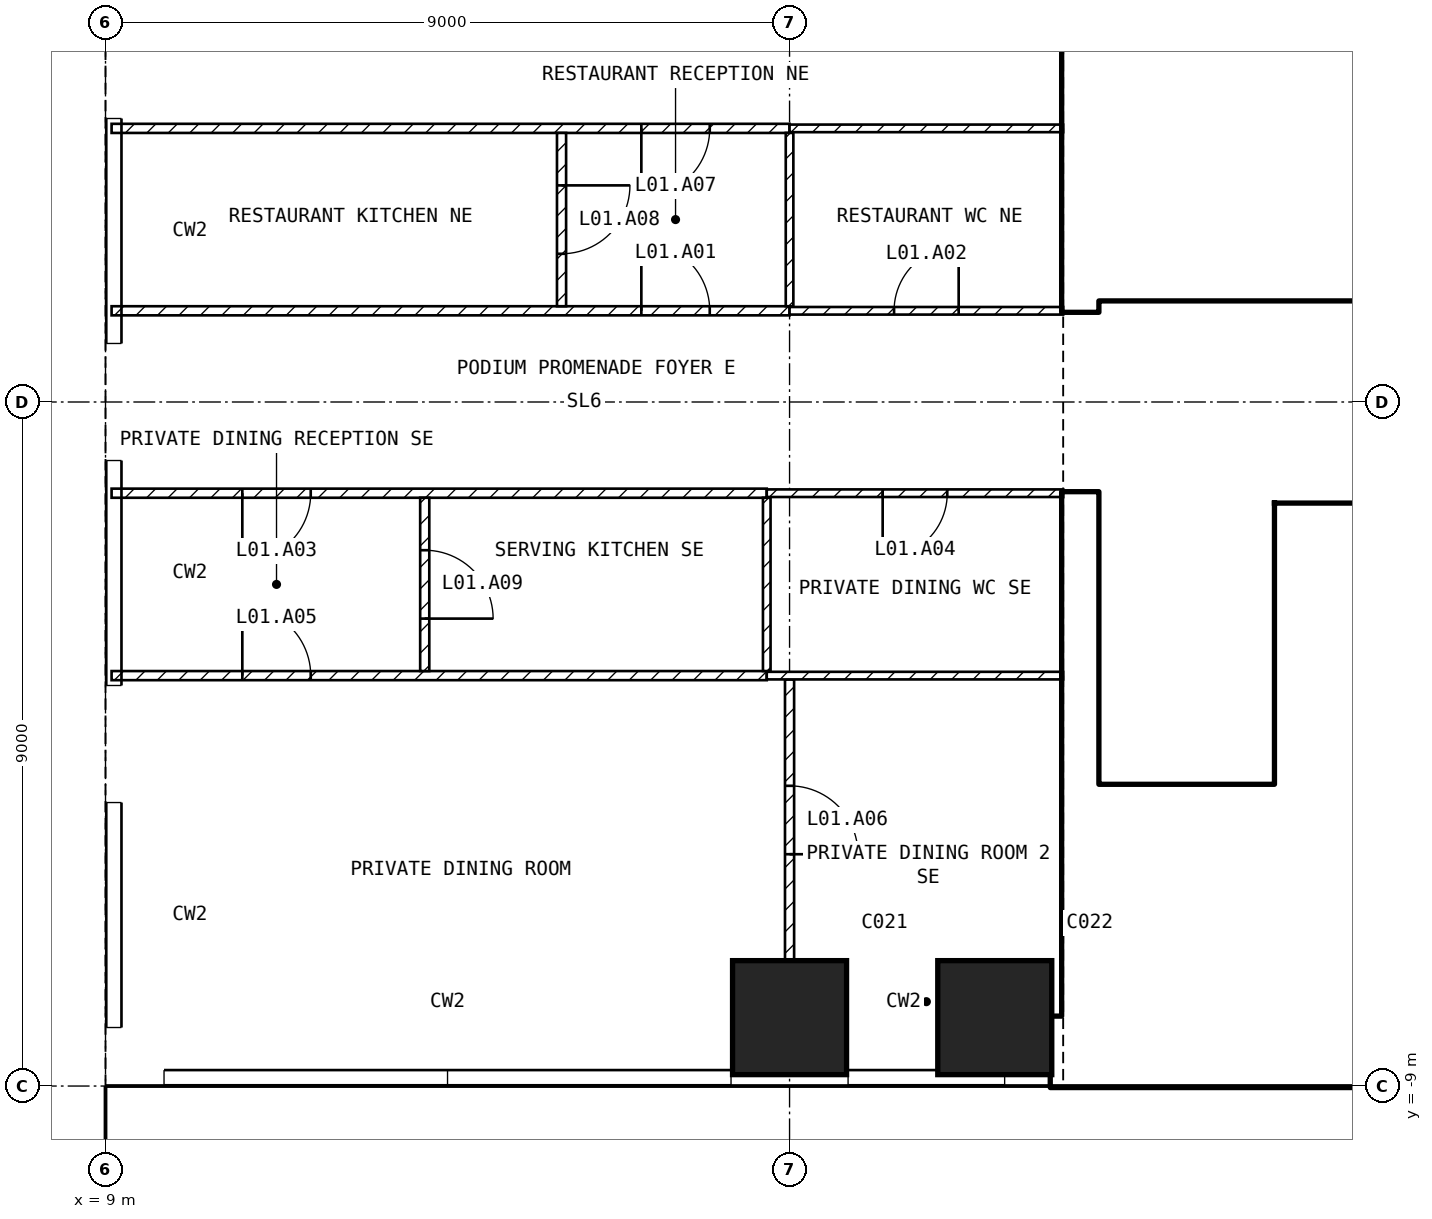
"""IFC4 building model, lengths in metres.
Left out: names, types, materials, properties, quantities, classifications, styles, units other than length and angle.
Written with IfcOpenShell. Run it as: python <this file> out.ifc"""

import sys

from ifc_helpers import new_model, si_unit, direction, frame, frame_2d, origin, origin_2d, place, context, subcontext, project, spatial, rectangle, extrude, element, fill, save


model = new_model("IFC4")
c1 = context("Model", 3, precision=1e-05, world=origin(), true_north=direction((0.0, 1.0)))
c2 = subcontext(c1, "Body", "Model", "MODEL_VIEW")
j1 = project(units=[si_unit("LENGTHUNIT", "METRE"), si_unit("PLANEANGLEUNIT", "RADIAN")], contexts=[c1])
p1 = place(None, origin())
s1 = spatial("IfcSite", under=j1, at=p1, CompositionType="ELEMENT")
p2 = place(p1, origin())
s2 = spatial("IfcBuilding", under=s1, at=p2, CompositionType="ELEMENT")
p3 = place(p2, origin())
s3 = spatial("IfcBuildingStorey", under=s2, at=p3, CompositionType="ELEMENT", Elevation=0.0)
p4 = place(p3, frame((7.65, -25.2, -0.4), z_axis=(0.0, 0.0, 1.0), x_axis=(0.0, 1.0, 0.0)))
e1 = element("IfcWall", 1, at=p4, inside=s3, PredefinedType="SOLIDWALL", context=c2, shape_type="SweptSolid", body=[
    extrude(rectangle(XDim=50.4, YDim=2.7, at=frame_2d((25.2, 0.0))), origin(), (0.0, 0.0, 1.0), 20.0),
])
p5 = place(p2, frame((0.0, 0.0, 15.0)))
s4 = spatial("IfcBuildingStorey", under=s2, at=p5, CompositionType="ELEMENT", Elevation=15.0)
for number, where, z_axis, x_axis in (
    (2, (18.0, -8.1, -0.3), (0.0, 0.0, 1.0), (1.0, 0.0, 0.0)),
    (3, (20.7, -8.1, -0.3), (0.0, 0.0, 1.0), (1.0, 0.0, 0.0)),
):
    element("IfcColumn", number, at=place(p5, frame(where, z_axis=z_axis, x_axis=x_axis)), inside=s4, PredefinedType="COLUMN", context=c2, shape_type="SweptSolid", body=[
        extrude(rectangle(XDim=1.5, YDim=1.5, at=origin_2d()), origin(), (0.0, 0.0, 1.0), 6.0),
    ])
p6 = place(p5, frame((21.45, -8.55, 0.0), z_axis=(0.0, 0.0, 1.0), x_axis=(1.0, 0.0, 0.0)))
e4 = element("IfcWall", 4, at=p6, inside=s4, PredefinedType="SHEAR", context=c2, shape_type="SweptSolid", body=[
    extrude(rectangle(XDim=10.95, YDim=0.9, at=frame_2d((5.475, 0.0))), origin(), (0.0, 0.0, 1.0), 5.7),
])
for number, where, z_axis, x_axis in (
    (5, (21.825, -8.1, 0.0), (0.0, 0.0, 1.0), (0.0, 1.0, 0.0)),
    (6, (21.825, 1.2, 0.0), (0.0, 0.0, 1.0), (0.0, 1.0, 0.0)),
):
    element("IfcWall", number, at=place(p5, frame(where, z_axis=z_axis, x_axis=x_axis)), inside=s4, PredefinedType="SHEAR", context=c2, shape_type="SweptSolid", body=[
        extrude(rectangle(XDim=6.9, YDim=0.45, at=frame_2d((3.45, 0.0))), origin(), (0.0, 0.0, 1.0), 5.7),
    ])
p7 = place(p5, frame((22.05, 1.45, 0.0), z_axis=(0.0, 0.0, 1.0), x_axis=(1.0, 0.0, 0.0)))
e7 = element("IfcWall", 7, at=p7, inside=s4, PredefinedType="SOLIDWALL", context=c2, shape_type="SweptSolid", body=[
    extrude(rectangle(XDim=13.05, YDim=0.2, at=frame_2d((6.525, 0.0))), origin(), (0.0, 0.0, 1.0), 5.7),
])
p8 = place(p7, frame((0.75, 0.0, 0.0)))
e8 = element("IfcOpeningElement", 8, at=p8, cuts=e7, PredefinedType="OPENING", context=c2, shape_type="SweptSolid", body=[
    extrude(rectangle(XDim=1.0, YDim=2.1, at=frame_2d((0.5, 1.05))), frame((0.0, 0.11, 0.0), z_axis=(0.0, -1.0, 0.0), x_axis=(1.0, 0.0, 0.0)), (0.0, 0.0, 1.0), 0.22),
])
p9 = place(p7, frame((3.25, 0.0, 0.0)))
e9 = element("IfcOpeningElement", 9, at=p9, cuts=e7, PredefinedType="OPENING", context=c2, shape_type="SweptSolid", body=[
    extrude(rectangle(XDim=1.0, YDim=2.1, at=frame_2d((0.5, 1.05))), frame((0.0, 0.11, 0.0), z_axis=(0.0, -1.0, 0.0), x_axis=(1.0, 0.0, 0.0)), (0.0, 0.0, 1.0), 0.22),
])
p10 = place(p5, frame((24.5, -5.05, 0.0), z_axis=(0.0, 0.0, 1.0), x_axis=(0.0, 1.0, 0.0)))
e10 = element("IfcWall", 10, at=p10, inside=s4, PredefinedType="SOLIDWALL", context=c2, shape_type="SweptSolid", body=[
    extrude(rectangle(XDim=3.7, YDim=0.2, at=frame_2d((1.85, 0.0))), origin(), (0.0, 0.0, 1.0), 5.7),
])
p11 = place(p10, frame((0.1, 0.0, 0.0)))
e11 = element("IfcOpeningElement", 11, at=p11, cuts=e10, PredefinedType="OPENING", context=c2, shape_type="SweptSolid", body=[
    extrude(rectangle(XDim=0.8, YDim=2.1, at=frame_2d((0.4, 1.05))), frame((0.0, 0.11, 0.0), z_axis=(0.0, -1.0, 0.0), x_axis=(1.0, 0.0, 0.0)), (0.0, 0.0, 1.0), 0.22),
])
p12 = place(p5, frame((22.05, -5.15, 0.0), z_axis=(0.0, 0.0, 1.0), x_axis=(1.0, 0.0, 0.0)))
e12 = element("IfcWall", 12, at=p12, inside=s4, PredefinedType="SOLIDWALL", context=c2, shape_type="SweptSolid", body=[
    extrude(rectangle(XDim=6.3, YDim=0.2, at=frame_2d((3.15, 0.0))), origin(), (0.0, 0.0, 1.0), 5.7),
])
p13 = place(p12, frame((0.2, 0.0, 0.0)))
e13 = element("IfcOpeningElement", 13, at=p13, cuts=e12, PredefinedType="OPENING", context=c2, shape_type="SweptSolid", body=[
    extrude(rectangle(XDim=1.0, YDim=2.1, at=frame_2d((0.5, 1.05))), frame((0.0, 0.11, 0.0), z_axis=(0.0, -1.0, 0.0), x_axis=(1.0, 0.0, 0.0)), (0.0, 0.0, 1.0), 0.22),
])
p14 = place(p5, frame((24.6, -1.45, 0.0), z_axis=(0.0, 0.0, 1.0), x_axis=(1.0, 0.0, 0.0)))
e14 = element("IfcWall", 14, at=p14, inside=s4, PredefinedType="SOLIDWALL", context=c2, shape_type="SweptSolid", body=[
    extrude(rectangle(XDim=10.5, YDim=0.2, at=frame_2d((5.25, 0.0))), origin(), (0.0, 0.0, 1.0), 5.7),
])
p15 = place(p14, frame((6.2, 0.0, 0.0)))
e15 = element("IfcOpeningElement", 15, at=p15, cuts=e14, PredefinedType="OPENING", context=c2, shape_type="SweptSolid", body=[
    extrude(rectangle(XDim=1.0, YDim=2.1, at=frame_2d((0.5, 1.05))), frame((0.0, 0.11, 0.0), z_axis=(0.0, -1.0, 0.0), x_axis=(1.0, 0.0, 0.0)), (0.0, 0.0, 1.0), 0.22),
])
p16 = place(p14, frame((7.75, 0.0, 0.0)))
e16 = element("IfcOpeningElement", 16, at=p16, cuts=e14, PredefinedType="OPENING", context=c2, shape_type="SweptSolid", body=[
    extrude(rectangle(XDim=1.0, YDim=2.1, at=frame_2d((0.5, 1.05))), frame((0.0, 0.11, 0.0), z_axis=(0.0, -1.0, 0.0), x_axis=(1.0, 0.0, 0.0)), (0.0, 0.0, 1.0), 0.22),
])
p17 = place(p14, frame((9.3, 0.0, 0.0)))
e17 = element("IfcOpeningElement", 17, at=p17, cuts=e14, PredefinedType="OPENING", context=c2, shape_type="SweptSolid", body=[
    extrude(rectangle(XDim=1.0, YDim=2.1, at=frame_2d((0.5, 1.05))), frame((0.0, 0.11, 0.0), z_axis=(0.0, -1.0, 0.0), x_axis=(1.0, 0.0, 0.0)), (0.0, 0.0, 1.0), 0.22),
])
p18 = place(p14, frame((0.45, 0.0, 0.0)))
e18 = element("IfcOpeningElement", 18, at=p18, cuts=e14, PredefinedType="OPENING", context=c2, shape_type="SweptSolid", body=[
    extrude(rectangle(XDim=0.9, YDim=2.1, at=frame_2d((0.45, 1.05))), frame((0.0, 0.11, 0.0), z_axis=(0.0, -1.0, 0.0), x_axis=(1.0, 0.0, 0.0)), (0.0, 0.0, 1.0), 0.22),
])
p19 = place(p14, frame((3.45, 0.0, 0.0)))
e19 = element("IfcOpeningElement", 19, at=p19, cuts=e14, PredefinedType="OPENING", context=c2, shape_type="SweptSolid", body=[
    extrude(rectangle(XDim=0.9, YDim=2.1, at=frame_2d((0.45, 1.05))), frame((0.0, 0.11, 0.0), z_axis=(0.0, -1.0, 0.0), x_axis=(1.0, 0.0, 0.0)), (0.0, 0.0, 1.0), 0.22),
])
p20 = place(p5, frame((24.6, -3.95, 0.0), z_axis=(0.0, 0.0, 1.0), x_axis=(1.0, 0.0, 0.0)))
e20 = element("IfcWall", 20, at=p20, inside=s4, PredefinedType="SOLIDWALL", context=c2, shape_type="SweptSolid", body=[
    extrude(rectangle(XDim=10.5, YDim=0.2, at=frame_2d((5.25, 0.0))), origin(), (0.0, 0.0, 1.0), 5.7),
])
p21 = place(p5, frame((9.08, 1.2, 0.0), z_axis=(0.0, 0.0, 1.0), x_axis=(1.0, 0.0, 0.0)))
e21 = element("IfcWall", 21, at=p21, inside=s4, PredefinedType="PARTITIONING", context=c2, shape_type="SweptSolid", body=[
    extrude(rectangle(XDim=8.92, YDim=0.12, at=frame_2d((4.46, 0.0))), origin(), (0.0, 0.0, 1.0), 5.7),
])
p22 = place(p21, frame((6.97, 0.0, 0.0)))
e22 = element("IfcOpeningElement", 22, at=p22, cuts=e21, PredefinedType="OPENING", context=c2, shape_type="SweptSolid", body=[
    extrude(rectangle(XDim=0.9, YDim=2.1, at=frame_2d((0.45, 1.05))), frame((0.0, 0.07, 0.0), z_axis=(0.0, -1.0, 0.0), x_axis=(1.0, 0.0, 0.0)), (0.0, 0.0, 1.0), 0.14),
])
p23 = place(p5, frame((18.0, 1.2, 0.0), z_axis=(0.0, 0.0, 1.0), x_axis=(1.0, 0.0, 0.0)))
e23 = element("IfcWall", 23, at=p23, inside=s4, PredefinedType="PARTITIONING", context=c2, shape_type="SweptSolid", body=[
    extrude(rectangle(XDim=3.6, YDim=0.1, at=frame_2d((1.8, 0.0))), origin(), (0.0, 0.0, 1.0), 5.7),
])
p24 = place(p23, frame((1.375, 0.0, 0.0)))
e24 = element("IfcOpeningElement", 24, at=p24, cuts=e23, PredefinedType="OPENING", context=c2, shape_type="SweptSolid", body=[
    extrude(rectangle(XDim=0.85, YDim=2.1, at=frame_2d((0.425, 1.05))), frame((0.0, 0.06, 0.0), z_axis=(0.0, -1.0, 0.0), x_axis=(1.0, 0.0, 0.0)), (0.0, 0.0, 1.0), 0.12),
])
p25 = place(p5, frame((17.7, -1.2, 0.0), z_axis=(0.0, 0.0, 1.0), x_axis=(-1.0, 0.0, 0.0)))
e25 = element("IfcWall", 25, at=p25, inside=s4, PredefinedType="PARTITIONING", context=c2, shape_type="SweptSolid", body=[
    extrude(rectangle(XDim=8.62, YDim=0.12, at=frame_2d((4.31, 0.0))), origin(), (0.0, 0.0, 1.0), 5.7),
])
p26 = place(p25, frame((6.0, 0.0, 0.0)))
e26 = element("IfcOpeningElement", 26, at=p26, cuts=e25, PredefinedType="OPENING", context=c2, shape_type="SweptSolid", body=[
    extrude(rectangle(XDim=0.9, YDim=2.1, at=frame_2d((0.45, 1.05))), frame((0.0, 0.07, 0.0), z_axis=(0.0, -1.0, 0.0), x_axis=(1.0, 0.0, 0.0)), (0.0, 0.0, 1.0), 0.14),
])
p27 = place(p5, frame((21.6, -1.2, 0.0), z_axis=(0.0, 0.0, 1.0), x_axis=(-1.0, 0.0, 0.0)))
e27 = element("IfcWall", 27, at=p27, inside=s4, PredefinedType="PARTITIONING", context=c2, shape_type="SweptSolid", body=[
    extrude(rectangle(XDim=3.9, YDim=0.1, at=frame_2d((1.95, 0.0))), origin(), (0.0, 0.0, 1.0), 5.7),
])
p28 = place(p27, frame((1.525, 0.0, 0.0)))
e28 = element("IfcOpeningElement", 28, at=p28, cuts=e27, PredefinedType="OPENING", context=c2, shape_type="SweptSolid", body=[
    extrude(rectangle(XDim=0.85, YDim=2.1, at=frame_2d((0.425, 1.05))), frame((0.0, 0.06, 0.0), z_axis=(0.0, -1.0, 0.0), x_axis=(1.0, 0.0, 0.0)), (0.0, 0.0, 1.0), 0.12),
])
p29 = place(p5, frame((18.0, 3.6, 0.0), z_axis=(0.0, 0.0, 1.0), x_axis=(-1.0, 0.0, 0.0)))
e29 = element("IfcWall", 29, at=p29, inside=s4, PredefinedType="PARTITIONING", context=c2, shape_type="SweptSolid", body=[
    extrude(rectangle(XDim=8.92, YDim=0.12, at=frame_2d((4.46, 0.0))), origin(), (0.0, 0.0, 1.0), 5.7),
])
p30 = place(p29, frame((1.05, 0.0, 0.0)))
e30 = element("IfcOpeningElement", 30, at=p30, cuts=e29, PredefinedType="OPENING", context=c2, shape_type="SweptSolid", body=[
    extrude(rectangle(XDim=0.9, YDim=2.1, at=frame_2d((0.45, 1.05))), frame((0.0, 0.07, 0.0), z_axis=(0.0, -1.0, 0.0), x_axis=(1.0, 0.0, 0.0)), (0.0, 0.0, 1.0), 0.14),
])
p31 = place(p5, frame((21.6, 3.6, 0.0), z_axis=(0.0, 0.0, 1.0), x_axis=(-1.0, 0.0, 0.0)))
e31 = element("IfcWall", 31, at=p31, inside=s4, PredefinedType="PARTITIONING", context=c2, shape_type="SweptSolid", body=[
    extrude(rectangle(XDim=3.6, YDim=0.1, at=frame_2d((1.8, 0.0))), origin(), (0.0, 0.0, 1.0), 5.7),
])
p32 = place(p5, frame((15.0, 3.54, 0.0), z_axis=(0.0, 0.0, 1.0), x_axis=(0.0, -1.0, 0.0)))
e32 = element("IfcWall", 32, at=p32, inside=s4, PredefinedType="PARTITIONING", context=c2, shape_type="SweptSolid", body=[
    extrude(rectangle(XDim=2.28, YDim=0.12, at=frame_2d((1.14, 0.0))), origin(), (0.0, 0.0, 1.0), 5.7),
])
p33 = place(p32, frame((0.69, 0.0, 0.0)))
e33 = element("IfcOpeningElement", 33, at=p33, cuts=e32, PredefinedType="OPENING", context=c2, shape_type="SweptSolid", body=[
    extrude(rectangle(XDim=0.9, YDim=2.1, at=frame_2d((0.45, 1.05))), frame((0.0, 0.07, 0.0), z_axis=(0.0, -1.0, 0.0), x_axis=(1.0, 0.0, 0.0)), (0.0, 0.0, 1.0), 0.14),
])
p34 = place(p5, frame((18.0, 3.54, 0.0), z_axis=(0.0, 0.0, 1.0), x_axis=(0.0, -1.0, 0.0)))
e34 = element("IfcWall", 34, at=p34, inside=s4, PredefinedType="PARTITIONING", context=c2, shape_type="SweptSolid", body=[
    extrude(rectangle(XDim=2.28, YDim=0.1, at=frame_2d((1.14, 0.0))), origin(), (0.0, 0.0, 1.0), 4.61),
])
p35 = place(p5, frame((18.0, -3.65, 0.0), z_axis=(0.0, 0.0, 1.0), x_axis=(0.0, -1.0, 0.0)))
e35 = element("IfcWall", 35, at=p35, inside=s4, PredefinedType="PARTITIONING", context=c2, shape_type="SweptSolid", body=[
    extrude(rectangle(XDim=3.7, YDim=0.12, at=frame_2d((1.85, 0.0))), origin(), (0.0, 0.0, 1.0), 4.61),
])
p36 = place(p35, frame((1.4, 0.0, 0.0)))
e36 = element("IfcOpeningElement", 36, at=p36, cuts=e35, PredefinedType="OPENING", context=c2, shape_type="SweptSolid", body=[
    extrude(rectangle(XDim=0.9, YDim=2.1, at=frame_2d((0.45, 1.05))), frame((0.0, 0.07, 0.0), z_axis=(0.0, -1.0, 0.0), x_axis=(1.0, 0.0, 0.0)), (0.0, 0.0, 1.0), 0.14),
])
p37 = place(p5, frame((9.08, -3.6, 0.0), z_axis=(0.0, 0.0, 1.0), x_axis=(1.0, 0.0, 0.0)))
e37 = element("IfcWall", 37, at=p37, inside=s4, PredefinedType="PARTITIONING", context=c2, shape_type="SweptSolid", body=[
    extrude(rectangle(XDim=8.62, YDim=0.12, at=frame_2d((4.31, 0.0))), origin(), (0.0, 0.0, 1.0), 5.7),
])
p38 = place(p37, frame((1.72, 0.0, 0.0)))
e38 = element("IfcOpeningElement", 38, at=p38, cuts=e37, PredefinedType="OPENING", context=c2, shape_type="SweptSolid", body=[
    extrude(rectangle(XDim=0.9, YDim=2.1, at=frame_2d((0.45, 1.05))), frame((0.0, 0.07, 0.0), z_axis=(0.0, -1.0, 0.0), x_axis=(1.0, 0.0, 0.0)), (0.0, 0.0, 1.0), 0.14),
])
p39 = place(p5, frame((17.7, -3.6, 0.0), z_axis=(0.0, 0.0, 1.0), x_axis=(1.0, 0.0, 0.0)))
e39 = element("IfcWall", 39, at=p39, inside=s4, PredefinedType="PARTITIONING", context=c2, shape_type="SweptSolid", body=[
    extrude(rectangle(XDim=3.9, YDim=0.1, at=frame_2d((1.95, 0.0))), origin(), (0.0, 0.0, 1.0), 5.7),
])
p40 = place(p5, frame((13.2, -1.26, 0.0), z_axis=(0.0, 0.0, 1.0), x_axis=(0.0, -1.0, 0.0)))
e40 = element("IfcWall", 40, at=p40, inside=s4, PredefinedType="PARTITIONING", context=c2, shape_type="SweptSolid", body=[
    extrude(rectangle(XDim=2.28, YDim=0.12, at=frame_2d((1.14, 0.0))), origin(), (0.0, 0.0, 1.0), 5.007),
])
p41 = place(p40, frame((0.69, 0.0, 0.0)))
e41 = element("IfcOpeningElement", 41, at=p41, cuts=e40, PredefinedType="OPENING", context=c2, shape_type="SweptSolid", body=[
    extrude(rectangle(XDim=0.9, YDim=2.1, at=frame_2d((0.45, 1.05))), frame((0.0, 0.07, 0.0), z_axis=(0.0, -1.0, 0.0), x_axis=(1.0, 0.0, 0.0)), (0.0, 0.0, 1.0), 0.14),
])
p42 = place(p5, frame((17.7, -1.26, 0.0), z_axis=(0.0, 0.0, 1.0), x_axis=(0.0, -1.0, 0.0)))
e42 = element("IfcWall", 42, at=p42, inside=s4, PredefinedType="PARTITIONING", context=c2, shape_type="SweptSolid", body=[
    extrude(rectangle(XDim=2.28, YDim=0.1, at=frame_2d((1.14, 0.0))), origin(), (0.0, 0.0, 1.0), 5.7),
])
p43 = place(p13, origin())
e43 = element("IfcDoor", 43, at=p43, inside=s4, OperationType="SINGLE_SWING_LEFT", PredefinedType="DOOR", context=c2, shape_type="SweptSolid", body=[
    extrude(rectangle(XDim=1.0, YDim=2.1, at=frame_2d((0.5, 1.05))), frame((0.0, 0.025, 0.0), z_axis=(0.0, -1.0, 0.0), x_axis=(1.0, 0.0, 0.0)), (0.0, 0.0, 1.0), 0.05),
])
fill(e13, e43)
p44 = place(p8, origin())
e44 = element("IfcDoor", 44, at=p44, inside=s4, OperationType="SINGLE_SWING_LEFT", PredefinedType="DOOR", context=c2, shape_type="SweptSolid", body=[
    extrude(rectangle(XDim=1.0, YDim=2.1, at=frame_2d((0.5, 1.05))), frame((0.0, 0.025, 0.0), z_axis=(0.0, -1.0, 0.0), x_axis=(1.0, 0.0, 0.0)), (0.0, 0.0, 1.0), 0.05),
])
fill(e8, e44)
p45 = place(p11, origin())
e45 = element("IfcDoor", 45, at=p45, inside=s4, OperationType="SINGLE_SWING_LEFT", PredefinedType="DOOR", context=c2, shape_type="SweptSolid", body=[
    extrude(rectangle(XDim=0.8, YDim=2.1, at=frame_2d((0.4, 1.05))), frame((0.0, 0.025, 0.0), z_axis=(0.0, -1.0, 0.0), x_axis=(1.0, 0.0, 0.0)), (0.0, 0.0, 1.0), 0.05),
])
fill(e11, e45)
p46 = place(p18, origin())
e46 = element("IfcDoor", 46, at=p46, inside=s4, OperationType="SINGLE_SWING_LEFT", PredefinedType="DOOR", context=c2, shape_type="SweptSolid", body=[
    extrude(rectangle(XDim=0.9, YDim=2.1, at=frame_2d((0.45, 1.05))), frame((0.0, 0.025, 0.0), z_axis=(0.0, -1.0, 0.0), x_axis=(1.0, 0.0, 0.0)), (0.0, 0.0, 1.0), 0.05),
])
fill(e18, e46)
p47 = place(p9, origin())
e47 = element("IfcDoor", 47, at=p47, inside=s4, OperationType="SINGLE_SWING_LEFT", PredefinedType="DOOR", context=c2, shape_type="SweptSolid", body=[
    extrude(rectangle(XDim=1.0, YDim=2.1, at=frame_2d((0.5, 1.05))), frame((0.0, 0.025, 0.0), z_axis=(0.0, -1.0, 0.0), x_axis=(1.0, 0.0, 0.0)), (0.0, 0.0, 1.0), 0.05),
])
fill(e9, e47)
p48 = place(p22, origin())
e48 = element("IfcDoor", 48, at=p48, inside=s4, OperationType="SINGLE_SWING_LEFT", PredefinedType="DOOR", context=c2, shape_type="SweptSolid", body=[
    extrude(rectangle(XDim=0.9, YDim=2.1, at=frame_2d((0.45, 1.05))), frame((0.0, 0.025, 0.0), z_axis=(0.0, -1.0, 0.0), x_axis=(1.0, 0.0, 0.0)), (0.0, 0.0, 1.0), 0.05),
])
fill(e22, e48)
p49 = place(p24, origin())
e49 = element("IfcDoor", 49, at=p49, inside=s4, OperationType="SINGLE_SWING_RIGHT", PredefinedType="DOOR", context=c2, shape_type="SweptSolid", body=[
    extrude(rectangle(XDim=0.85, YDim=2.1, at=frame_2d((0.425, 1.05))), frame((0.0, 0.025, 0.0), z_axis=(0.0, -1.0, 0.0), x_axis=(1.0, 0.0, 0.0)), (0.0, 0.0, 1.0), 0.05),
])
fill(e24, e49)
p50 = place(p26, origin())
e50 = element("IfcDoor", 50, at=p50, inside=s4, OperationType="SINGLE_SWING_RIGHT", PredefinedType="DOOR", context=c2, shape_type="SweptSolid", body=[
    extrude(rectangle(XDim=0.9, YDim=2.1, at=frame_2d((0.45, 1.05))), frame((0.0, 0.025, 0.0), z_axis=(0.0, -1.0, 0.0), x_axis=(1.0, 0.0, 0.0)), (0.0, 0.0, 1.0), 0.05),
])
fill(e26, e50)
p51 = place(p28, origin())
e51 = element("IfcDoor", 51, at=p51, inside=s4, OperationType="SINGLE_SWING_RIGHT", PredefinedType="DOOR", context=c2, shape_type="SweptSolid", body=[
    extrude(rectangle(XDim=0.85, YDim=2.1, at=frame_2d((0.425, 1.05))), frame((0.0, 0.025, 0.0), z_axis=(0.0, -1.0, 0.0), x_axis=(1.0, 0.0, 0.0)), (0.0, 0.0, 1.0), 0.05),
])
fill(e28, e51)
p52 = place(p38, origin())
e52 = element("IfcDoor", 52, at=p52, inside=s4, OperationType="SINGLE_SWING_LEFT", PredefinedType="DOOR", context=c2, shape_type="SweptSolid", body=[
    extrude(rectangle(XDim=0.9, YDim=2.1, at=frame_2d((0.45, 1.05))), frame((0.0, 0.025, 0.0), z_axis=(0.0, -1.0, 0.0), x_axis=(1.0, 0.0, 0.0)), (0.0, 0.0, 1.0), 0.05),
])
fill(e38, e52)
p53 = place(p36, origin())
e53 = element("IfcDoor", 53, at=p53, inside=s4, OperationType="SINGLE_SWING_RIGHT", PredefinedType="DOOR", context=c2, shape_type="SweptSolid", body=[
    extrude(rectangle(XDim=0.9, YDim=2.1, at=frame_2d((0.45, 1.05))), frame((0.0, 0.025, 0.0), z_axis=(0.0, -1.0, 0.0), x_axis=(1.0, 0.0, 0.0)), (0.0, 0.0, 1.0), 0.05),
])
fill(e36, e53)
p54 = place(p30, origin())
e54 = element("IfcDoor", 54, at=p54, inside=s4, OperationType="SINGLE_SWING_RIGHT", PredefinedType="DOOR", context=c2, shape_type="SweptSolid", body=[
    extrude(rectangle(XDim=0.9, YDim=2.1, at=frame_2d((0.45, 1.05))), frame((0.0, 0.025, 0.0), z_axis=(0.0, -1.0, 0.0), x_axis=(1.0, 0.0, 0.0)), (0.0, 0.0, 1.0), 0.05),
])
fill(e30, e54)
p55 = place(p33, origin())
e55 = element("IfcDoor", 55, at=p55, inside=s4, OperationType="SINGLE_SWING_LEFT", PredefinedType="DOOR", context=c2, shape_type="SweptSolid", body=[
    extrude(rectangle(XDim=0.9, YDim=2.1, at=frame_2d((0.45, 1.05))), frame((0.0, 0.025, 0.0), z_axis=(0.0, -1.0, 0.0), x_axis=(1.0, 0.0, 0.0)), (0.0, 0.0, 1.0), 0.05),
])
fill(e33, e55)
p56 = place(p41, origin())
e56 = element("IfcDoor", 56, at=p56, inside=s4, OperationType="SINGLE_SWING_RIGHT", PredefinedType="DOOR", context=c2, shape_type="SweptSolid", body=[
    extrude(rectangle(XDim=0.9, YDim=2.1, at=frame_2d((0.45, 1.05))), frame((0.0, 0.025, 0.0), z_axis=(0.0, -1.0, 0.0), x_axis=(1.0, 0.0, 0.0)), (0.0, 0.0, 1.0), 0.05),
])
fill(e41, e56)
save(model, sys.argv[1])
